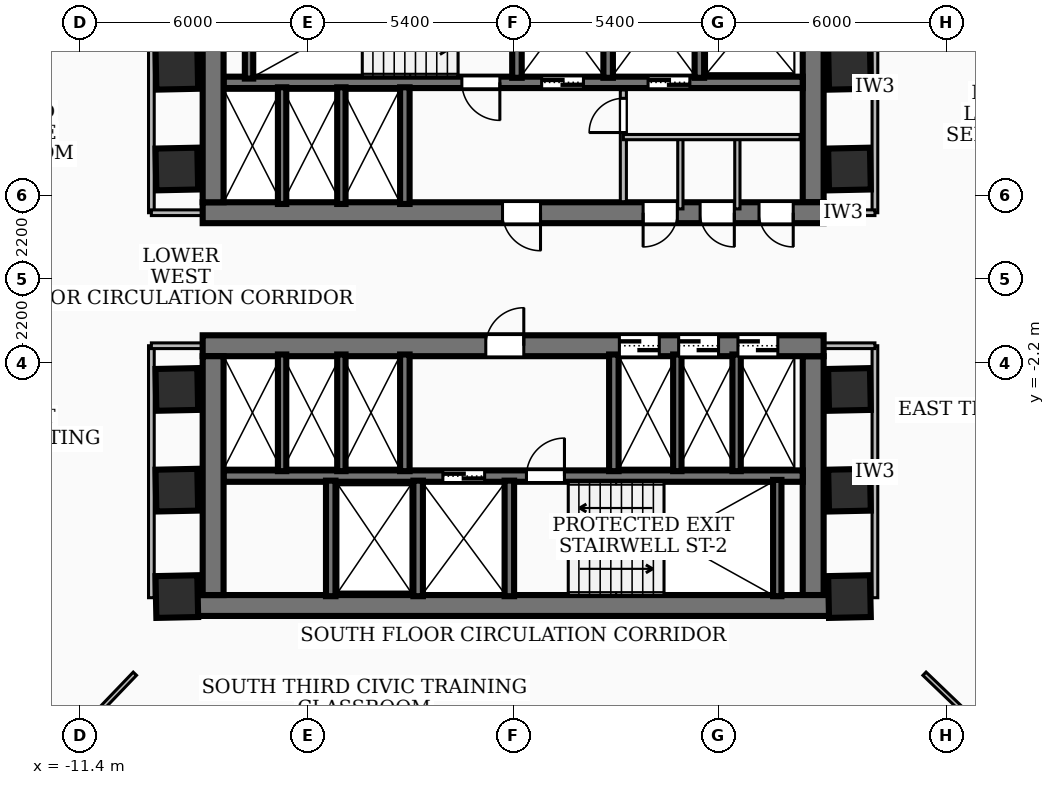
"""IFC4 building model, lengths in metres.
Left out: names, types, materials, properties, quantities, classifications, styles, units other than length and angle.
Written with IfcOpenShell. Run it as: python <this file> out.ifc"""

import sys

from ifc_helpers import new_model, si_unit, direction, frame, frame_2d, origin, origin_2d, place, context, subcontext, project, spatial, rectangle, extrude, element, fill, save


model = new_model("IFC4")
c1 = context("Model", 3, precision=1e-05, world=origin(), true_north=direction((0.0, 1.0)))
c2 = subcontext(c1, "Body", "Model", "MODEL_VIEW")
j1 = project(units=[si_unit("LENGTHUNIT", "METRE"), si_unit("PLANEANGLEUNIT", "RADIAN")], contexts=[c1])
p1 = place(None, origin())
s1 = spatial("IfcSite", under=j1, at=p1, CompositionType="ELEMENT")
p2 = place(p1, origin())
s2 = spatial("IfcBuilding", under=s1, at=p2, CompositionType="ELEMENT")
p3 = place(p2, frame((0.0, 0.0, 35.28)))
s3 = spatial("IfcBuildingStorey", under=s2, at=p3, CompositionType="ELEMENT", Elevation=35.28)
p4 = place(p3, frame((8.17, 1.75, 0.0), z_axis=(0.0, 0.0, 1.0), x_axis=(-1.0, 0.0, 0.0)))
e1 = element("IfcWall", 1, at=p4, inside=s3, PredefinedType="SHEAR", context=c2, shape_type="SweptSolid", body=[
    extrude(rectangle(XDim=16.34, YDim=0.55, at=frame_2d((8.17, 0.0))), origin(), (0.0, 0.0, 1.0), 3.34),
])
p5 = place(p4, frame((7.45, 0.0, 0.0)))
e2 = element("IfcOpeningElement", 2, at=p5, cuts=e1, PredefinedType="OPENING", context=c2, shape_type="SweptSolid", body=[
    extrude(rectangle(XDim=1.0, YDim=2.1, at=frame_2d((0.5, 1.05))), frame((0.0, 0.285, 0.0), z_axis=(0.0, -1.0, 0.0), x_axis=(1.0, 0.0, 0.0)), (0.0, 0.0, 1.0), 0.57),
])
p6 = place(p4, frame((3.85, 0.0, 0.0)))
e3 = element("IfcOpeningElement", 3, at=p6, cuts=e1, PredefinedType="OPENING", context=c2, shape_type="SweptSolid", body=[
    extrude(rectangle(XDim=0.9, YDim=2.06, at=frame_2d((0.45, 1.03))), frame((0.0, 0.285, 0.0), z_axis=(0.0, -1.0, 0.0), x_axis=(1.0, 0.0, 0.0)), (0.0, 0.0, 1.0), 0.57),
])
p7 = place(p4, frame((2.35, 0.0, 0.0)))
e4 = element("IfcOpeningElement", 4, at=p7, cuts=e1, PredefinedType="OPENING", context=c2, shape_type="SweptSolid", body=[
    extrude(rectangle(XDim=0.9, YDim=2.06, at=frame_2d((0.45, 1.03))), frame((0.0, 0.285, 0.0), z_axis=(0.0, -1.0, 0.0), x_axis=(1.0, 0.0, 0.0)), (0.0, 0.0, 1.0), 0.57),
])
p8 = place(p4, frame((0.8, 0.0, 0.0)))
e5 = element("IfcOpeningElement", 5, at=p8, cuts=e1, PredefinedType="OPENING", context=c2, shape_type="SweptSolid", body=[
    extrude(rectangle(XDim=0.9, YDim=2.06, at=frame_2d((0.45, 1.03))), frame((0.0, 0.285, 0.0), z_axis=(0.0, -1.0, 0.0), x_axis=(1.0, 0.0, 0.0)), (0.0, 0.0, 1.0), 0.57),
])
for number, where, z_axis, x_axis in (
    (6, (-7.895, 2.025, 0.0), (0.0, 0.0, 1.0), (0.0, 1.0, 0.0)),
    (7, (7.895, 8.31, 0.0), (0.0, 0.0, 1.0), (0.0, -1.0, 0.0)),
):
    element("IfcWall", number, at=place(p3, frame(where, z_axis=z_axis, x_axis=x_axis)), inside=s3, PredefinedType="SHEAR", context=c2, shape_type="SweptSolid", body=[
        extrude(rectangle(XDim=6.285, YDim=0.55, at=frame_2d((3.143, 0.0))), origin(), (0.0, 0.0, 1.0), 3.34),
    ])
p9 = place(p3, frame((7.62, 5.18, 0.0), z_axis=(0.0, 0.0, 1.0), x_axis=(-1.0, 0.0, 0.0)))
e8 = element("IfcWall", 8, at=p9, inside=s3, PredefinedType="SOLIDWALL", context=c2, shape_type="SweptSolid", body=[
    extrude(rectangle(XDim=15.24, YDim=0.3, at=frame_2d((7.62, 0.0))), origin(), (0.0, 0.0, 1.0), 3.34),
])
p10 = place(p9, frame((5.77, 0.0, 0.0)))
e9 = element("IfcOpeningElement", 9, at=p10, cuts=e8, PredefinedType="OPENING", context=c2, shape_type="SweptSolid", body=[
    extrude(rectangle(XDim=1.1, YDim=2.15, at=frame_2d((0.55, 1.075))), frame((0.0, 0.16, 0.0), z_axis=(0.0, -1.0, 0.0), x_axis=(1.0, 0.0, 0.0)), (0.0, 0.0, 1.0), 0.32),
])
p11 = place(p9, frame((2.97, 0.0, 0.0)))
e10 = element("IfcOpeningElement", 10, at=p11, cuts=e8, PredefinedType="OPENING", context=c2, shape_type="SweptSolid", body=[
    extrude(rectangle(XDim=1.1, YDim=2.15, at=frame_2d((0.55, 1.075))), frame((0.0, 0.16, 0.0), z_axis=(0.0, -1.0, 0.0), x_axis=(1.0, 0.0, 0.0)), (0.0, 0.0, 1.0), 0.32),
])
p12 = place(p9, frame((7.97, 0.0, 0.0)))
e11 = element("IfcOpeningElement", 11, at=p12, cuts=e8, PredefinedType="OPENING", context=c2, shape_type="SweptSolid", body=[
    extrude(rectangle(XDim=1.0, YDim=2.1, at=frame_2d((0.5, 1.05))), frame((0.0, 0.16, 0.0), z_axis=(0.0, -1.0, 0.0), x_axis=(1.0, 0.0, 0.0)), (0.0, 0.0, 1.0), 0.32),
])
p13 = place(p3, frame((8.78, -8.585, 0.0), z_axis=(0.0, 0.0, 1.0), x_axis=(-1.0, 0.0, 0.0)))
e12 = element("IfcWall", 12, at=p13, inside=s3, PredefinedType="SHEAR", context=c2, shape_type="SweptSolid", body=[
    extrude(rectangle(XDim=17.56, YDim=0.55, at=frame_2d((8.78, 0.0))), origin(), (0.0, 0.0, 1.0), 3.34),
])
p14 = place(p3, frame((-8.17, -1.75, 0.0), z_axis=(0.0, 0.0, 1.0), x_axis=(1.0, 0.0, 0.0)))
e13 = element("IfcWall", 13, at=p14, inside=s3, PredefinedType="SHEAR", context=c2, shape_type="SweptSolid", body=[
    extrude(rectangle(XDim=16.34, YDim=0.55, at=frame_2d((8.17, 0.0))), origin(), (0.0, 0.0, 1.0), 3.34),
])
p15 = place(p14, frame((7.45, 0.0, 0.0)))
e14 = element("IfcOpeningElement", 14, at=p15, cuts=e13, PredefinedType="OPENING", context=c2, shape_type="SweptSolid", body=[
    extrude(rectangle(XDim=1.0, YDim=2.1, at=frame_2d((0.5, 1.05))), frame((0.0, 0.285, 0.0), z_axis=(0.0, -1.0, 0.0), x_axis=(1.0, 0.0, 0.0)), (0.0, 0.0, 1.0), 0.57),
])
p16 = place(p14, frame((10.965, 0.0, 0.0)))
e15 = element("IfcOpeningElement", 15, at=p16, cuts=e13, PredefinedType="OPENING", context=c2, shape_type="SweptSolid", body=[
    extrude(rectangle(XDim=1.05, YDim=2.15, at=frame_2d((0.525, 1.075))), frame((0.0, 0.285, 0.0), z_axis=(0.0, -1.0, 0.0), x_axis=(1.0, 0.0, 0.0)), (0.0, 0.0, 1.0), 0.57),
])
p17 = place(p14, frame((12.525, 0.0, 0.0)))
e16 = element("IfcOpeningElement", 16, at=p17, cuts=e13, PredefinedType="OPENING", context=c2, shape_type="SweptSolid", body=[
    extrude(rectangle(XDim=1.05, YDim=2.15, at=frame_2d((0.525, 1.075))), frame((0.0, 0.285, 0.0), z_axis=(0.0, -1.0, 0.0), x_axis=(1.0, 0.0, 0.0)), (0.0, 0.0, 1.0), 0.57),
])
p18 = place(p14, frame((14.085, 0.0, 0.0)))
e17 = element("IfcOpeningElement", 17, at=p18, cuts=e13, PredefinedType="OPENING", context=c2, shape_type="SweptSolid", body=[
    extrude(rectangle(XDim=1.05, YDim=2.15, at=frame_2d((0.525, 1.075))), frame((0.0, 0.285, 0.0), z_axis=(0.0, -1.0, 0.0), x_axis=(1.0, 0.0, 0.0)), (0.0, 0.0, 1.0), 0.57),
])
for number, where, z_axis, x_axis in (
    (18, (-7.895, -8.31, 0.0), (0.0, 0.0, 1.0), (0.0, 1.0, 0.0)),
    (19, (7.895, -2.025, 0.0), (0.0, 0.0, 1.0), (0.0, -1.0, 0.0)),
):
    element("IfcWall", number, at=place(p3, frame(where, z_axis=z_axis, x_axis=x_axis)), inside=s3, PredefinedType="SHEAR", context=c2, shape_type="SweptSolid", body=[
        extrude(rectangle(XDim=6.285, YDim=0.55, at=frame_2d((3.143, 0.0))), origin(), (0.0, 0.0, 1.0), 3.34),
    ])
p19 = place(p3, frame((-7.62, -5.18, 0.0), z_axis=(0.0, 0.0, 1.0), x_axis=(1.0, 0.0, 0.0)))
e20 = element("IfcWall", 20, at=p19, inside=s3, PredefinedType="SOLIDWALL", context=c2, shape_type="SweptSolid", body=[
    extrude(rectangle(XDim=15.24, YDim=0.3, at=frame_2d((7.62, 0.0))), origin(), (0.0, 0.0, 1.0), 3.34),
])
p20 = place(p19, frame((5.77, 0.0, 0.0)))
e21 = element("IfcOpeningElement", 21, at=p20, cuts=e20, PredefinedType="OPENING", context=c2, shape_type="SweptSolid", body=[
    extrude(rectangle(XDim=1.1, YDim=2.15, at=frame_2d((0.55, 1.075))), frame((0.0, 0.16, 0.0), z_axis=(0.0, -1.0, 0.0), x_axis=(1.0, 0.0, 0.0)), (0.0, 0.0, 1.0), 0.32),
])
p21 = place(p19, frame((7.97, 0.0, 0.0)))
e22 = element("IfcOpeningElement", 22, at=p21, cuts=e20, PredefinedType="OPENING", context=c2, shape_type="SweptSolid", body=[
    extrude(rectangle(XDim=1.0, YDim=2.1, at=frame_2d((0.5, 1.05))), frame((0.0, 0.16, 0.0), z_axis=(0.0, -1.0, 0.0), x_axis=(1.0, 0.0, 0.0)), (0.0, 0.0, 1.0), 0.32),
])
for number, where, z_axis, x_axis in (
    (23, (-6.95, 5.28, 0.0), (0.0, 0.0, 1.0), (0.0, 1.0, 0.0)),
    (24, (6.95, -8.34, 0.0), (0.0, 0.0, 1.0), (0.0, 1.0, 0.0)),
):
    element("IfcWall", number, at=place(p3, frame(where, z_axis=z_axis, x_axis=x_axis)), inside=s3, PredefinedType="SOLIDWALL", context=c2, shape_type="SweptSolid", body=[
        extrude(rectangle(XDim=3.06, YDim=0.22, at=frame_2d((1.53, 0.0))), origin(), (0.0, 0.0, 1.0), 3.34),
    ])
for number, where, z_axis, x_axis in (
    (25, (0.1, 5.3, 0.0), (0.0, 0.0, 1.0), (0.0, 1.0, 0.0)),
    (26, (2.5, 5.3, 0.0), (0.0, 0.0, 1.0), (0.0, 1.0, 0.0)),
    (27, (4.9, 5.3, 0.0), (0.0, 0.0, 1.0), (0.0, 1.0, 0.0)),
):
    element("IfcWall", number, at=place(p3, frame(where, z_axis=z_axis, x_axis=x_axis)), inside=s3, PredefinedType="SOLIDWALL", context=c2, shape_type="SweptSolid", body=[
        extrude(rectangle(XDim=3.04, YDim=0.25, at=frame_2d((1.52, 0.0))), origin(), (0.0, 0.0, 1.0), 3.34),
    ])
p22 = place(p3, frame((-2.85, 1.98, 0.0), z_axis=(0.0, 0.0, 1.0), x_axis=(0.0, 1.0, 0.0)))
e28 = element("IfcWall", 28, at=p22, inside=s3, PredefinedType="SOLIDWALL", context=c2, shape_type="SweptSolid", body=[
    extrude(rectangle(XDim=3.07, YDim=0.25, at=frame_2d((1.535, 0.0))), origin(), (0.0, 0.0, 1.0), 3.34),
])
for number, where, z_axis, x_axis in (
    (29, (-0.1, -8.34, 0.0), (0.0, 0.0, 1.0), (0.0, 1.0, 0.0)),
    (30, (-2.5, -8.34, 0.0), (0.0, 0.0, 1.0), (0.0, 1.0, 0.0)),
    (31, (-4.8, -8.34, 0.0), (0.0, 0.0, 1.0), (0.0, 1.0, 0.0)),
):
    element("IfcWall", number, at=place(p3, frame(where, z_axis=z_axis, x_axis=x_axis)), inside=s3, PredefinedType="SOLIDWALL", context=c2, shape_type="SweptSolid", body=[
        extrude(rectangle(XDim=3.04, YDim=0.25, at=frame_2d((1.52, 0.0))), origin(), (0.0, 0.0, 1.0), 3.34),
    ])
for number, where, z_axis, x_axis in (
    (32, (-2.85, -5.05, 0.0), (0.0, 0.0, 1.0), (0.0, 1.0, 0.0)),
    (33, (2.65, -5.05, 0.0), (0.0, 0.0, 1.0), (0.0, 1.0, 0.0)),
):
    element("IfcWall", number, at=place(p3, frame(where, z_axis=z_axis, x_axis=x_axis)), inside=s3, PredefinedType="SOLIDWALL", context=c2, shape_type="SweptSolid", body=[
        extrude(rectangle(XDim=3.07, YDim=0.25, at=frame_2d((1.535, 0.0))), origin(), (0.0, 0.0, 1.0), 3.34),
    ])
for number, where, z_axis, x_axis in (
    (34, (-6.08, 1.98, 0.0), (0.0, 0.0, 1.0), (0.0, 1.0, 0.0)),
    (35, (-4.52, 1.98, 0.0), (0.0, 0.0, 1.0), (0.0, 1.0, 0.0)),
    (36, (4.32, -5.05, 0.0), (0.0, 0.0, 1.0), (0.0, 1.0, 0.0)),
    (37, (5.88, -5.05, 0.0), (0.0, 0.0, 1.0), (0.0, 1.0, 0.0)),
    (38, (-6.08, -5.05, 0.0), (0.0, 0.0, 1.0), (0.0, 1.0, 0.0)),
    (39, (-4.52, -5.05, 0.0), (0.0, 0.0, 1.0), (0.0, 1.0, 0.0)),
):
    element("IfcWall", number, at=place(p3, frame(where, z_axis=z_axis, x_axis=x_axis)), inside=s3, PredefinedType="SOLIDWALL", context=c2, shape_type="SweptSolid", body=[
        extrude(rectangle(XDim=3.07, YDim=0.22, at=frame_2d((1.535, 0.0))), origin(), (0.0, 0.0, 1.0), 3.34),
    ])
for number, where, z_axis, x_axis in (
    (40, (-8.85, -5.55, 0.0), (0.0, 0.0, 1.0), (1.0, 0.021, 0.0)),
    (41, (-8.85, -2.9, 0.0), (0.0, 0.0, 1.0), (1.0, 0.021, 0.0)),
    (42, (-8.85, 2.9, 0.0), (0.0, 0.0, 1.0), (1.0, 0.021, 0.0)),
    (43, (-8.85, 5.55, 0.0), (0.0, 0.0, 1.0), (1.0, 0.021, 0.0)),
    (44, (8.85, -5.55, 0.0), (0.0, 0.0, 1.0), (1.0, 0.021, 0.0)),
    (45, (8.85, -2.9, 0.0), (0.0, 0.0, 1.0), (1.0, 0.021, 0.0)),
    (46, (8.85, 2.9, 0.0), (0.0, 0.0, 1.0), (1.0, 0.021, 0.0)),
    (47, (8.85, 5.55, 0.0), (0.0, 0.0, 1.0), (1.0, 0.021, 0.0)),
    (48, (8.85, -8.35, 0.0), (0.0, 0.0, 1.0), (1.0, 0.021, 0.0)),
    (49, (-8.85, -8.35, 0.0), (0.0, 0.0, 1.0), (1.0, 0.021, 0.0)),
):
    element("IfcColumn", number, at=place(p3, frame(where, z_axis=z_axis, x_axis=x_axis)), inside=s3, PredefinedType="COLUMN", context=c2, shape_type="SweptSolid", body=[
        extrude(rectangle(XDim=1.1, YDim=1.1, at=origin_2d()), origin(), (0.0, 0.0, 1.0), 3.6),
    ])
p23 = place(p3, frame((2.9, 2.04, 0.0), z_axis=(0.0, 0.0, 1.0), x_axis=(0.0, 1.0, 0.0)))
e50 = element("IfcWall", 50, at=p23, inside=s3, PredefinedType="PARTITIONING", context=c2, shape_type="SweptSolid", body=[
    extrude(rectangle(XDim=2.94, YDim=0.16, at=frame_2d((1.47, 0.0))), origin(), (0.0, 0.0, 1.0), 2.405),
])
p24 = place(p23, frame((1.82, 0.0, 0.0)))
e51 = element("IfcOpeningElement", 51, at=p24, cuts=e50, PredefinedType="OPENING", context=c2, shape_type="SweptSolid", body=[
    extrude(rectangle(XDim=0.9, YDim=2.06, at=frame_2d((0.45, 1.03))), frame((0.0, 0.09, 0.0), z_axis=(0.0, -1.0, 0.0), x_axis=(1.0, 0.0, 0.0)), (0.0, 0.0, 1.0), 0.18),
])
p25 = place(p3, frame((2.9, 3.74, 0.0), z_axis=(0.0, 0.0, 1.0), x_axis=(1.0, 0.0, 0.0)))
e52 = element("IfcWall", 52, at=p25, inside=s3, PredefinedType="PARTITIONING", context=c2, shape_type="SweptSolid", body=[
    extrude(rectangle(XDim=4.65, YDim=0.138, at=frame_2d((2.325, 0.0))), origin(), (0.0, 0.0, 1.0), 3.34),
])
for number, where, z_axis, x_axis in (
    (53, (4.4, 1.85, 0.0), (0.0, 0.0, 1.0), (0.0, 1.0, 0.0)),
    (54, (5.9, 1.85, 0.0), (0.0, 0.0, 1.0), (0.0, 1.0, 0.0)),
):
    element("IfcWall", number, at=place(p3, frame(where, z_axis=z_axis, x_axis=x_axis)), inside=s3, PredefinedType="PARTITIONING", context=c2, shape_type="SweptSolid", body=[
        extrude(rectangle(XDim=1.89, YDim=0.138, at=frame_2d((0.945, 0.0))), origin(), (0.0, 0.0, 1.0), 2.405),
    ])
p26 = place(p3, frame((-9.52, 1.75, 0.0), z_axis=(0.0, 0.0, 1.0), x_axis=(0.0, 1.0, 0.0)))
e55 = element("IfcWall", 55, at=p26, inside=s3, PredefinedType="PARTITIONING", context=c2, shape_type="SweptSolid", body=[
    extrude(rectangle(XDim=6.63, YDim=0.15, at=frame_2d((3.315, 0.0))), origin(), (0.0, 0.0, 1.0), 2.421),
])
p27 = place(p3, frame((-7.85, 1.75, 0.0), z_axis=(0.0, 0.0, 1.0), x_axis=(-1.0, 0.0, 0.0)))
e56 = element("IfcWall", 56, at=p27, inside=s3, PredefinedType="PARTITIONING", context=c2, shape_type="SweptSolid", body=[
    extrude(rectangle(XDim=1.67, YDim=0.15, at=frame_2d((0.835, 0.0))), origin(), (0.0, 0.0, 1.0), 2.405),
])
p28 = place(p3, frame((-9.52, -8.38, 0.0), z_axis=(0.0, 0.0, 1.0), x_axis=(0.0, 1.0, 0.0)))
e57 = element("IfcWall", 57, at=p28, inside=s3, PredefinedType="PARTITIONING", context=c2, shape_type="SweptSolid", body=[
    extrude(rectangle(XDim=6.63, YDim=0.15, at=frame_2d((3.315, 0.0))), origin(), (0.0, 0.0, 1.0), 2.421),
])
p29 = place(p3, frame((-7.85, -1.75, 0.0), z_axis=(0.0, 0.0, 1.0), x_axis=(-1.0, 0.0, 0.0)))
e58 = element("IfcWall", 58, at=p29, inside=s3, PredefinedType="PARTITIONING", context=c2, shape_type="SweptSolid", body=[
    extrude(rectangle(XDim=1.67, YDim=0.15, at=frame_2d((0.835, 0.0))), origin(), (0.0, 0.0, 1.0), 2.405),
])
p30 = place(p3, frame((9.52, 1.75, 0.0), z_axis=(0.0, 0.0, 1.0), x_axis=(0.0, 1.0, 0.0)))
e59 = element("IfcWall", 59, at=p30, inside=s3, PredefinedType="PARTITIONING", context=c2, shape_type="SweptSolid", body=[
    extrude(rectangle(XDim=6.63, YDim=0.15, at=frame_2d((3.315, 0.0))), origin(), (0.0, 0.0, 1.0), 2.421),
])
p31 = place(p3, frame((7.85, 1.75, 0.0), z_axis=(0.0, 0.0, 1.0), x_axis=(1.0, 0.0, 0.0)))
e60 = element("IfcWall", 60, at=p31, inside=s3, PredefinedType="PARTITIONING", context=c2, shape_type="SweptSolid", body=[
    extrude(rectangle(XDim=1.67, YDim=0.15, at=frame_2d((0.835, 0.0))), origin(), (0.0, 0.0, 1.0), 2.405),
])
p32 = place(p3, frame((9.52, -8.38, 0.0), z_axis=(0.0, 0.0, 1.0), x_axis=(0.0, 1.0, 0.0)))
e61 = element("IfcWall", 61, at=p32, inside=s3, PredefinedType="PARTITIONING", context=c2, shape_type="SweptSolid", body=[
    extrude(rectangle(XDim=6.63, YDim=0.15, at=frame_2d((3.315, 0.0))), origin(), (0.0, 0.0, 1.0), 2.421),
])
p33 = place(p3, frame((7.85, -1.75, 0.0), z_axis=(0.0, 0.0, 1.0), x_axis=(1.0, 0.0, 0.0)))
e62 = element("IfcWall", 62, at=p33, inside=s3, PredefinedType="PARTITIONING", context=c2, shape_type="SweptSolid", body=[
    extrude(rectangle(XDim=1.67, YDim=0.15, at=frame_2d((0.835, 0.0))), origin(), (0.0, 0.0, 1.0), 2.405),
])
p34 = place(p3, frame((-9.954, -10.38, 0.0), z_axis=(0.0, 0.0, 1.0), x_axis=(-0.692136602063, -0.721766530178, 0.0)))
e63 = element("IfcWall", 63, at=p34, inside=s3, PredefinedType="PARTITIONING", context=c2, shape_type="SweptSolid", body=[
    extrude(rectangle(XDim=5.273, YDim=0.12, at=frame_2d((2.637, 0.0))), origin(), (0.0, 0.0, 1.0), 2.644),
])
p35 = place(p3, frame((10.824, -10.38, 0.0), z_axis=(0.0, 0.0, 1.0), x_axis=(0.721757981693, -0.692145516392, 0.0)))
e64 = element("IfcWall", 64, at=p35, inside=s3, PredefinedType="PARTITIONING", context=c2, shape_type="SweptSolid", body=[
    extrude(rectangle(XDim=4.658, YDim=0.12, at=frame_2d((2.329, 0.0))), origin(), (0.0, 0.0, 1.0), 3.34),
])
p36 = place(p5, origin())
e65 = element("IfcDoor", 65, at=p36, inside=s3, OperationType="SINGLE_SWING_LEFT", PredefinedType="DOOR", context=c2, shape_type="SweptSolid", body=[
    extrude(rectangle(XDim=1.0, YDim=2.1, at=frame_2d((0.5, 1.05))), frame((0.0, 0.025, 0.0), z_axis=(0.0, -1.0, 0.0), x_axis=(1.0, 0.0, 0.0)), (0.0, 0.0, 1.0), 0.05),
])
fill(e2, e65)
p37 = place(p15, origin())
e66 = element("IfcDoor", 66, at=p37, inside=s3, OperationType="SINGLE_SWING_RIGHT", PredefinedType="DOOR", context=c2, shape_type="SweptSolid", body=[
    extrude(rectangle(XDim=1.0, YDim=2.1, at=frame_2d((0.5, 1.05))), frame((0.0, 0.025, 0.0), z_axis=(0.0, -1.0, 0.0), x_axis=(1.0, 0.0, 0.0)), (0.0, 0.0, 1.0), 0.05),
])
fill(e14, e66)
p38 = place(p10, origin())
e67 = element("IfcDoor", 67, at=p38, inside=s3, OperationType="DOUBLE_DOOR_SLIDING", PredefinedType="DOOR", context=c2, shape_type="SweptSolid", body=[
    extrude(rectangle(XDim=1.1, YDim=2.15, at=frame_2d((0.55, 1.075))), frame((0.0, 0.025, 0.0), z_axis=(0.0, -1.0, 0.0), x_axis=(1.0, 0.0, 0.0)), (0.0, 0.0, 1.0), 0.05),
])
fill(e9, e67)
p39 = place(p11, origin())
e68 = element("IfcDoor", 68, at=p39, inside=s3, OperationType="DOUBLE_DOOR_SLIDING", PredefinedType="DOOR", context=c2, shape_type="SweptSolid", body=[
    extrude(rectangle(XDim=1.1, YDim=2.15, at=frame_2d((0.55, 1.075))), frame((0.0, 0.025, 0.0), z_axis=(0.0, -1.0, 0.0), x_axis=(1.0, 0.0, 0.0)), (0.0, 0.0, 1.0), 0.05),
])
fill(e10, e68)
p40 = place(p12, origin())
e69 = element("IfcDoor", 69, at=p40, inside=s3, OperationType="SINGLE_SWING_LEFT", PredefinedType="DOOR", context=c2, shape_type="SweptSolid", body=[
    extrude(rectangle(XDim=1.0, YDim=2.1, at=frame_2d((0.5, 1.05))), frame((0.0, 0.025, 0.0), z_axis=(0.0, -1.0, 0.0), x_axis=(1.0, 0.0, 0.0)), (0.0, 0.0, 1.0), 0.05),
])
fill(e11, e69)
p41 = place(p20, origin())
e70 = element("IfcDoor", 70, at=p41, inside=s3, OperationType="DOUBLE_DOOR_SLIDING", PredefinedType="DOOR", context=c2, shape_type="SweptSolid", body=[
    extrude(rectangle(XDim=1.1, YDim=2.15, at=frame_2d((0.55, 1.075))), frame((0.0, 0.025, 0.0), z_axis=(0.0, -1.0, 0.0), x_axis=(1.0, 0.0, 0.0)), (0.0, 0.0, 1.0), 0.05),
])
fill(e21, e70)
p42 = place(p21, origin())
e71 = element("IfcDoor", 71, at=p42, inside=s3, OperationType="SINGLE_SWING_RIGHT", PredefinedType="DOOR", context=c2, shape_type="SweptSolid", body=[
    extrude(rectangle(XDim=1.0, YDim=2.1, at=frame_2d((0.5, 1.05))), frame((0.0, 0.025, 0.0), z_axis=(0.0, -1.0, 0.0), x_axis=(1.0, 0.0, 0.0)), (0.0, 0.0, 1.0), 0.05),
])
fill(e22, e71)
p43 = place(p16, origin())
e72 = element("IfcDoor", 72, at=p43, inside=s3, OperationType="DOUBLE_DOOR_SLIDING", PredefinedType="DOOR", context=c2, shape_type="SweptSolid", body=[
    extrude(rectangle(XDim=1.05, YDim=2.15, at=frame_2d((0.525, 1.075))), frame((0.0, 0.025, 0.0), z_axis=(0.0, -1.0, 0.0), x_axis=(1.0, 0.0, 0.0)), (0.0, 0.0, 1.0), 0.05),
])
fill(e15, e72)
p44 = place(p17, origin())
e73 = element("IfcDoor", 73, at=p44, inside=s3, OperationType="DOUBLE_DOOR_SLIDING", PredefinedType="DOOR", context=c2, shape_type="SweptSolid", body=[
    extrude(rectangle(XDim=1.05, YDim=2.15, at=frame_2d((0.525, 1.075))), frame((0.0, 0.025, 0.0), z_axis=(0.0, -1.0, 0.0), x_axis=(1.0, 0.0, 0.0)), (0.0, 0.0, 1.0), 0.05),
])
fill(e16, e73)
p45 = place(p18, origin())
e74 = element("IfcDoor", 74, at=p45, inside=s3, OperationType="DOUBLE_DOOR_SLIDING", PredefinedType="DOOR", context=c2, shape_type="SweptSolid", body=[
    extrude(rectangle(XDim=1.05, YDim=2.15, at=frame_2d((0.525, 1.075))), frame((0.0, 0.025, 0.0), z_axis=(0.0, -1.0, 0.0), x_axis=(1.0, 0.0, 0.0)), (0.0, 0.0, 1.0), 0.05),
])
fill(e17, e74)
p46 = place(p6, origin())
e75 = element("IfcDoor", 75, at=p46, inside=s3, OperationType="SINGLE_SWING_RIGHT", PredefinedType="DOOR", context=c2, shape_type="SweptSolid", body=[
    extrude(rectangle(XDim=0.9, YDim=2.06, at=frame_2d((0.45, 1.03))), frame((0.0, 0.025, 0.0), z_axis=(0.0, -1.0, 0.0), x_axis=(1.0, 0.0, 0.0)), (0.0, 0.0, 1.0), 0.05),
])
fill(e3, e75)
p47 = place(p7, origin())
e76 = element("IfcDoor", 76, at=p47, inside=s3, OperationType="SINGLE_SWING_LEFT", PredefinedType="DOOR", context=c2, shape_type="SweptSolid", body=[
    extrude(rectangle(XDim=0.9, YDim=2.06, at=frame_2d((0.45, 1.03))), frame((0.0, 0.025, 0.0), z_axis=(0.0, -1.0, 0.0), x_axis=(1.0, 0.0, 0.0)), (0.0, 0.0, 1.0), 0.05),
])
fill(e4, e76)
p48 = place(p8, origin())
e77 = element("IfcDoor", 77, at=p48, inside=s3, OperationType="SINGLE_SWING_LEFT", PredefinedType="DOOR", context=c2, shape_type="SweptSolid", body=[
    extrude(rectangle(XDim=0.9, YDim=2.06, at=frame_2d((0.45, 1.03))), frame((0.0, 0.025, 0.0), z_axis=(0.0, -1.0, 0.0), x_axis=(1.0, 0.0, 0.0)), (0.0, 0.0, 1.0), 0.05),
])
fill(e5, e77)
p49 = place(p24, origin())
e78 = element("IfcDoor", 78, at=p49, inside=s3, OperationType="SINGLE_SWING_LEFT", PredefinedType="DOOR", context=c2, shape_type="SweptSolid", body=[
    extrude(rectangle(XDim=0.9, YDim=2.06, at=frame_2d((0.45, 1.03))), frame((0.0, 0.025, 0.0), z_axis=(0.0, -1.0, 0.0), x_axis=(1.0, 0.0, 0.0)), (0.0, 0.0, 1.0), 0.05),
])
fill(e51, e78)
save(model, sys.argv[1])
